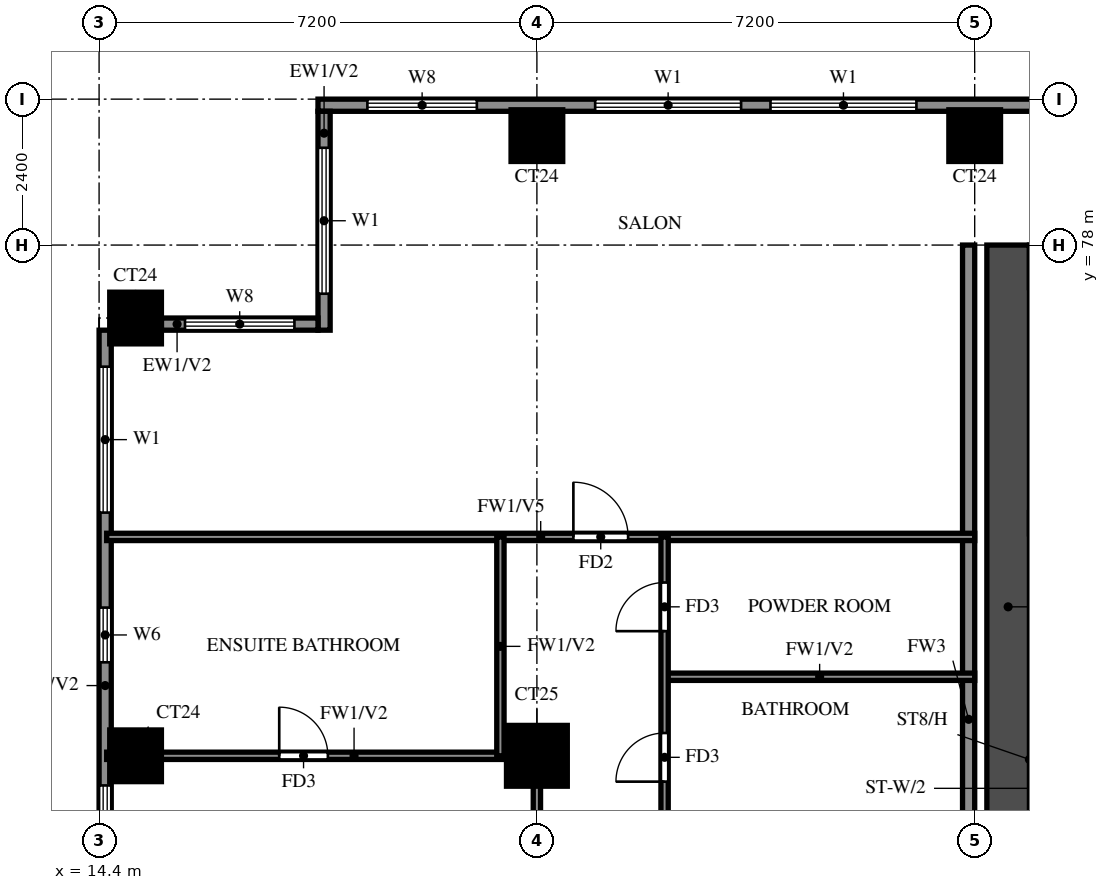
"""IFC4 building model, lengths in metres.
Left out: names, types, materials, properties, quantities, classifications, styles, units other than length and angle.
Written with IfcOpenShell. Run it as: python <this file> out.ifc"""

import sys

from ifc_helpers import new_model, si_unit, direction, frame, frame_2d, origin, origin_2d, place, context, subcontext, project, spatial, rectangle, extrude, source, transform, mapped, element, fill, save


model = new_model("IFC4")
c1 = context("Model", 3, precision=1e-05, world=origin(), true_north=direction((0.0, 1.0)))
c2 = subcontext(c1, "Body", "Model", "MODEL_VIEW")
j1 = project(units=[si_unit("LENGTHUNIT", "METRE"), si_unit("PLANEANGLEUNIT", "RADIAN")], contexts=[c1])
p1 = place(None, origin())
s1 = spatial("IfcSite", under=j1, at=p1, CompositionType="ELEMENT")
p2 = place(p1, origin())
s2 = spatial("IfcBuilding", under=s1, at=p2, CompositionType="ELEMENT")
p3 = place(p2, frame((0.0, 0.0, 157.0)))
s3 = spatial("IfcBuildingStorey", under=s2, at=p3, CompositionType="ELEMENT", Elevation=157.0)
m1 = source(origin(), c2, "Body", "SweptSolid", [
    extrude(rectangle(XDim=0.85, YDim=0.85, at=origin_2d()), origin(), (0.0, 0.0, 1.0), 3.2),
])
p4 = place(p3, frame((15.0, 69.6, 0.0), z_axis=(0.0, 0.0, 1.0), x_axis=(1.0, 0.0, 0.0)))
e1 = element("IfcColumn", 1, at=p4, inside=s3, PredefinedType="COLUMN", context=c2, shape_type="MappedRepresentation", body=[
    mapped(m1, transform((0.0, 0.0, 0.0))),
])
m2 = source(origin(), c2, "Body", "SweptSolid", [
    extrude(rectangle(XDim=1.0, YDim=1.0, at=origin_2d()), origin(), (0.0, 0.0, 1.0), 3.2),
])
p5 = place(p3, frame((21.6, 69.6, 0.0), z_axis=(0.0, 0.0, 1.0), x_axis=(1.0, 0.0, 0.0)))
e2 = element("IfcColumn", 2, at=p5, inside=s3, PredefinedType="COLUMN", context=c2, shape_type="MappedRepresentation", body=[
    mapped(m2, transform((0.0, 0.0, 0.0))),
])
for number, where, z_axis, x_axis in (
    (3, (15.0, 76.8, 0.0), (0.0, 0.0, 1.0), (1.0, 0.0, 0.0)),
    (4, (21.6, 79.8, 0.0), (0.0, 0.0, 1.0), (1.0, 0.0, 0.0)),
    (5, (28.8, 79.8, 0.0), (0.0, 0.0, 1.0), (1.0, 0.0, 0.0)),
):
    element("IfcColumn", number, at=place(p3, frame(where, z_axis=z_axis, x_axis=x_axis)), inside=s3, PredefinedType="COLUMN", context=c2, shape_type="MappedRepresentation", body=[
        mapped(m1, transform((0.0, 0.0, 0.0))),
    ])
p6 = place(p3, frame((29.35, 66.1, 0.0), z_axis=(0.0, 0.0, 1.0), x_axis=(0.0, 1.0, 0.0)))
e6 = element("IfcWall", 6, at=p6, inside=s3, PredefinedType="SHEAR", context=c2, shape_type="SweptSolid", body=[
    extrude(rectangle(XDim=11.9, YDim=0.7, at=frame_2d((5.95, 0.0))), origin(), (0.0, 0.0, 1.0), 3.2),
])
p7 = place(p3, frame((82.6, 80.3, 0.0), z_axis=(0.0, 0.0, 1.0), x_axis=(-1.0, 0.0, 0.0)))
e7 = element("IfcWall", 7, at=p7, inside=s3, PredefinedType="SOLIDWALL", context=c2, shape_type="SweptSolid", body=[
    extrude(rectangle(XDim=64.6, YDim=0.2, at=frame_2d((32.3, 0.0))), origin(), (0.0, 0.0, 1.0), 3.2),
])
p8 = place(p7, frame((4.3, 0.0, 0.0)))
e8 = element("IfcOpeningElement", 8, at=p8, cuts=e7, PredefinedType="OPENING", context=c2, shape_type="SweptSolid", body=[
    extrude(rectangle(XDim=1.8, YDim=2.4, at=frame_2d((0.9, 1.2))), frame((0.0, 0.11, 0.0), z_axis=(0.0, -1.0, 0.0), x_axis=(1.0, 0.0, 0.0)), (0.0, 0.0, 1.0), 0.22),
])
p9 = place(p7, frame((54.758, 0.0, 0.6)))
e9 = element("IfcOpeningElement", 9, at=p9, cuts=e7, PredefinedType="OPENING", context=c2, shape_type="SweptSolid", body=[
    extrude(rectangle(XDim=2.4, YDim=2.4, at=frame_2d((1.2, 1.2))), frame((0.0, 0.11, 0.0), z_axis=(0.0, -1.0, 0.0), x_axis=(1.0, 0.0, 0.0)), (0.0, 0.0, 1.0), 0.22),
])
p10 = place(p7, frame((57.642, 0.0, 0.6)))
e10 = element("IfcOpeningElement", 10, at=p10, cuts=e7, PredefinedType="OPENING", context=c2, shape_type="SweptSolid", body=[
    extrude(rectangle(XDim=2.4, YDim=2.4, at=frame_2d((1.2, 1.2))), frame((0.0, 0.11, 0.0), z_axis=(0.0, -1.0, 0.0), x_axis=(1.0, 0.0, 0.0)), (0.0, 0.0, 1.0), 0.22),
])
p11 = place(p7, frame((61.988, 0.0, 0.6)))
e11 = element("IfcOpeningElement", 11, at=p11, cuts=e7, PredefinedType="OPENING", context=c2, shape_type="SweptSolid", body=[
    extrude(rectangle(XDim=1.8, YDim=2.4, at=frame_2d((0.9, 1.2))), frame((0.0, 0.11, 0.0), z_axis=(0.0, -1.0, 0.0), x_axis=(1.0, 0.0, 0.0)), (0.0, 0.0, 1.0), 0.22),
])
p12 = place(p7, frame((1.712, 0.0, 0.6)))
e12 = element("IfcOpeningElement", 12, at=p12, cuts=e7, PredefinedType="OPENING", context=c2, shape_type="SweptSolid", body=[
    extrude(rectangle(XDim=1.2, YDim=2.4, at=frame_2d((0.6, 1.2))), frame((0.0, 0.11, 0.0), z_axis=(0.0, -1.0, 0.0), x_axis=(1.0, 0.0, 0.0)), (0.0, 0.0, 1.0), 0.22),
])
p13 = place(p7, frame((6.55, 0.0, 0.6)))
e13 = element("IfcOpeningElement", 13, at=p13, cuts=e7, PredefinedType="OPENING", context=c2, shape_type="SweptSolid", body=[
    extrude(rectangle(XDim=0.9, YDim=2.4, at=frame_2d((0.45, 1.2))), frame((0.0, 0.11, 0.0), z_axis=(0.0, -1.0, 0.0), x_axis=(1.0, 0.0, 0.0)), (0.0, 0.0, 1.0), 0.22),
])
p14 = place(p7, frame((8.312, 0.0, 0.6)))
e14 = element("IfcOpeningElement", 14, at=p14, cuts=e7, PredefinedType="OPENING", context=c2, shape_type="SweptSolid", body=[
    extrude(rectangle(XDim=1.8, YDim=2.4, at=frame_2d((0.9, 1.2))), frame((0.0, 0.11, 0.0), z_axis=(0.0, -1.0, 0.0), x_axis=(1.0, 0.0, 0.0)), (0.0, 0.0, 1.0), 0.22),
])
p15 = place(p3, frame((18.1, 80.2, 0.0), z_axis=(0.0, 0.0, 1.0), x_axis=(0.0, -1.0, 0.0)))
e15 = element("IfcWall", 15, at=p15, inside=s3, PredefinedType="SOLIDWALL", context=c2, shape_type="SweptSolid", body=[
    extrude(rectangle(XDim=3.6, YDim=0.2, at=frame_2d((1.8, 0.0))), origin(), (0.0, 0.0, 1.0), 3.2),
])
p16 = place(p15, frame((0.6, 0.0, 0.6)))
e16 = element("IfcOpeningElement", 16, at=p16, cuts=e15, PredefinedType="OPENING", context=c2, shape_type="SweptSolid", body=[
    extrude(rectangle(XDim=2.4, YDim=2.4, at=frame_2d((1.2, 1.2))), frame((0.0, 0.11, 0.0), z_axis=(0.0, -1.0, 0.0), x_axis=(1.0, 0.0, 0.0)), (0.0, 0.0, 1.0), 0.22),
])
p17 = place(p3, frame((18.0, 76.7, 0.0), z_axis=(0.0, 0.0, 1.0), x_axis=(-1.0, 0.0, 0.0)))
e17 = element("IfcWall", 17, at=p17, inside=s3, PredefinedType="SOLIDWALL", context=c2, shape_type="SweptSolid", body=[
    extrude(rectangle(XDim=2.575, YDim=0.2, at=frame_2d((1.288, 0.0))), origin(), (0.0, 0.0, 1.0), 3.2),
])
p18 = place(p17, frame((0.387, 0.0, 0.6)))
e18 = element("IfcOpeningElement", 18, at=p18, cuts=e17, PredefinedType="OPENING", context=c2, shape_type="SweptSolid", body=[
    extrude(rectangle(XDim=1.8, YDim=2.4, at=frame_2d((0.9, 1.2))), frame((0.0, 0.11, 0.0), z_axis=(0.0, -1.0, 0.0), x_axis=(1.0, 0.0, 0.0)), (0.0, 0.0, 1.0), 0.22),
])
p19 = place(p3, frame((14.5, 76.6, 0.0), z_axis=(0.0, 0.0, 1.0), x_axis=(0.0, -1.0, 0.0)))
e19 = element("IfcWall", 19, at=p19, inside=s3, PredefinedType="SOLIDWALL", context=c2, shape_type="SweptSolid", body=[
    extrude(rectangle(XDim=33.4, YDim=0.2, at=frame_2d((16.7, 0.0))), origin(), (0.0, 0.0, 1.0), 3.2),
])
p20 = place(p19, frame((11.5, 0.0, 0.0)))
e20 = element("IfcOpeningElement", 20, at=p20, cuts=e19, PredefinedType="OPENING", context=c2, shape_type="SweptSolid", body=[
    extrude(rectangle(XDim=1.8, YDim=2.4, at=frame_2d((0.9, 1.2))), frame((0.0, 0.11, 0.0), z_axis=(0.0, -1.0, 0.0), x_axis=(1.0, 0.0, 0.0)), (0.0, 0.0, 1.0), 0.22),
])
p21 = place(p19, frame((25.9, 0.0, 0.0)))
e21 = element("IfcOpeningElement", 21, at=p21, cuts=e19, PredefinedType="OPENING", context=c2, shape_type="SweptSolid", body=[
    extrude(rectangle(XDim=1.8, YDim=2.4, at=frame_2d((0.9, 1.2))), frame((0.0, 0.11, 0.0), z_axis=(0.0, -1.0, 0.0), x_axis=(1.0, 0.0, 0.0)), (0.0, 0.0, 1.0), 0.22),
])
p22 = place(p19, frame((29.087, 0.0, 0.6)))
e22 = element("IfcOpeningElement", 22, at=p22, cuts=e19, PredefinedType="OPENING", context=c2, shape_type="SweptSolid", body=[
    extrude(rectangle(XDim=1.2, YDim=2.4, at=frame_2d((0.6, 1.2))), frame((0.0, 0.11, 0.0), z_axis=(0.0, -1.0, 0.0), x_axis=(1.0, 0.0, 0.0)), (0.0, 0.0, 1.0), 0.22),
])
p23 = place(p19, frame((31.2, 0.0, 0.6)))
e23 = element("IfcOpeningElement", 23, at=p23, cuts=e19, PredefinedType="OPENING", context=c2, shape_type="SweptSolid", body=[
    extrude(rectangle(XDim=1.8, YDim=2.4, at=frame_2d((0.9, 1.2))), frame((0.0, 0.11, 0.0), z_axis=(0.0, -1.0, 0.0), x_axis=(1.0, 0.0, 0.0)), (0.0, 0.0, 1.0), 0.22),
])
p24 = place(p19, frame((21.887, 0.0, 0.6)))
e24 = element("IfcOpeningElement", 24, at=p24, cuts=e19, PredefinedType="OPENING", context=c2, shape_type="SweptSolid", body=[
    extrude(rectangle(XDim=1.8, YDim=2.4, at=frame_2d((0.9, 1.2))), frame((0.0, 0.11, 0.0), z_axis=(0.0, -1.0, 0.0), x_axis=(1.0, 0.0, 0.0)), (0.0, 0.0, 1.0), 0.22),
])
p25 = place(p19, frame((24.55, 0.0, 0.6)))
e25 = element("IfcOpeningElement", 25, at=p25, cuts=e19, PredefinedType="OPENING", context=c2, shape_type="SweptSolid", body=[
    extrude(rectangle(XDim=0.9, YDim=2.4, at=frame_2d((0.45, 1.2))), frame((0.0, 0.11, 0.0), z_axis=(0.0, -1.0, 0.0), x_axis=(1.0, 0.0, 0.0)), (0.0, 0.0, 1.0), 0.22),
])
p26 = place(p19, frame((18.212, 0.0, 0.6)))
e26 = element("IfcOpeningElement", 26, at=p26, cuts=e19, PredefinedType="OPENING", context=c2, shape_type="SweptSolid", body=[
    extrude(rectangle(XDim=2.4, YDim=2.4, at=frame_2d((1.2, 1.2))), frame((0.0, 0.11, 0.0), z_axis=(0.0, -1.0, 0.0), x_axis=(1.0, 0.0, 0.0)), (0.0, 0.0, 1.0), 0.22),
])
p27 = place(p19, frame((14.688, 0.0, 0.6)))
e27 = element("IfcOpeningElement", 27, at=p27, cuts=e19, PredefinedType="OPENING", context=c2, shape_type="SweptSolid", body=[
    extrude(rectangle(XDim=1.2, YDim=2.4, at=frame_2d((0.6, 1.2))), frame((0.0, 0.11, 0.0), z_axis=(0.0, -1.0, 0.0), x_axis=(1.0, 0.0, 0.0)), (0.0, 0.0, 1.0), 0.22),
])
p28 = place(p19, frame((16.75, 0.0, 0.6)))
e28 = element("IfcOpeningElement", 28, at=p28, cuts=e19, PredefinedType="OPENING", context=c2, shape_type="SweptSolid", body=[
    extrude(rectangle(XDim=0.9, YDim=2.4, at=frame_2d((0.45, 1.2))), frame((0.0, 0.11, 0.0), z_axis=(0.0, -1.0, 0.0), x_axis=(1.0, 0.0, 0.0)), (0.0, 0.0, 1.0), 0.22),
])
p29 = place(p19, frame((7.488, 0.0, 0.6)))
e29 = element("IfcOpeningElement", 29, at=p29, cuts=e19, PredefinedType="OPENING", context=c2, shape_type="SweptSolid", body=[
    extrude(rectangle(XDim=1.8, YDim=2.4, at=frame_2d((0.9, 1.2))), frame((0.0, 0.11, 0.0), z_axis=(0.0, -1.0, 0.0), x_axis=(1.0, 0.0, 0.0)), (0.0, 0.0, 1.0), 0.22),
])
p30 = place(p19, frame((10.15, 0.0, 0.6)))
e30 = element("IfcOpeningElement", 30, at=p30, cuts=e19, PredefinedType="OPENING", context=c2, shape_type="SweptSolid", body=[
    extrude(rectangle(XDim=0.9, YDim=2.4, at=frame_2d((0.45, 1.2))), frame((0.0, 0.11, 0.0), z_axis=(0.0, -1.0, 0.0), x_axis=(1.0, 0.0, 0.0)), (0.0, 0.0, 1.0), 0.22),
])
p31 = place(p19, frame((4.562, 0.0, 1.5)))
e31 = element("IfcOpeningElement", 31, at=p31, cuts=e19, PredefinedType="OPENING", context=c2, shape_type="SweptSolid", body=[
    extrude(rectangle(XDim=0.9, YDim=0.9, at=frame_2d((0.45, 0.45))), frame((0.0, 0.11, 0.0), z_axis=(0.0, -1.0, 0.0), x_axis=(1.0, 0.0, 0.0)), (0.0, 0.0, 1.0), 0.22),
])
p32 = place(p19, frame((0.6, 0.0, 0.6)))
e32 = element("IfcOpeningElement", 32, at=p32, cuts=e19, PredefinedType="OPENING", context=c2, shape_type="SweptSolid", body=[
    extrude(rectangle(XDim=2.4, YDim=2.4, at=frame_2d((1.2, 1.2))), frame((0.0, 0.11, 0.0), z_axis=(0.0, -1.0, 0.0), x_axis=(1.0, 0.0, 0.0)), (0.0, 0.0, 1.0), 0.22),
])
p33 = place(p3, frame((28.7, 62.4, 0.0), z_axis=(0.0, 0.0, 1.0), x_axis=(0.0, 1.0, 0.0)))
e33 = element("IfcWall", 33, at=p33, inside=s3, PredefinedType="SOLIDWALL", context=c2, shape_type="SweptSolid", body=[
    extrude(rectangle(XDim=15.6, YDim=0.2, at=frame_2d((7.8, 0.0))), origin(), (0.0, 0.0, 1.0), 3.2),
])
p34 = place(p3, frame((14.525, 69.6, 0.0), z_axis=(0.0, 0.0, 1.0), x_axis=(1.0, 0.0, 0.0)))
e34 = element("IfcWall", 34, at=p34, inside=s3, PredefinedType="PARTITIONING", context=c2, shape_type="SweptSolid", body=[
    extrude(rectangle(XDim=7.075, YDim=0.12, at=frame_2d((3.538, 0.0))), origin(), (0.0, 0.0, 1.0), 3.2),
])
p35 = place(p34, frame((2.837, 0.0, 0.0)))
e35 = element("IfcOpeningElement", 35, at=p35, cuts=e34, PredefinedType="OPENING", context=c2, shape_type="SweptSolid", body=[
    extrude(rectangle(XDim=0.8, YDim=2.1, at=frame_2d((0.4, 1.05))), frame((0.0, 0.07, 0.0), z_axis=(0.0, -1.0, 0.0), x_axis=(1.0, 0.0, 0.0)), (0.0, 0.0, 1.0), 0.14),
])
p36 = place(p3, frame((23.7, 70.9, 0.0), z_axis=(0.0, 0.0, 1.0), x_axis=(1.0, 0.0, 0.0)))
e36 = element("IfcWall", 36, at=p36, inside=s3, PredefinedType="PARTITIONING", context=c2, shape_type="SweptSolid", body=[
    extrude(rectangle(XDim=5.1, YDim=0.12, at=frame_2d((2.55, 0.0))), origin(), (0.0, 0.0, 1.0), 3.2),
])
p37 = place(p3, frame((14.525, 73.2, 0.0), z_axis=(0.0, 0.0, 1.0), x_axis=(1.0, 0.0, 0.0)))
e37 = element("IfcWall", 37, at=p37, inside=s3, PredefinedType="PARTITIONING", context=c2, shape_type="SweptSolid", body=[
    extrude(rectangle(XDim=14.275, YDim=0.12, at=frame_2d((7.138, 0.0))), origin(), (0.0, 0.0, 1.0), 2.3),
])
p38 = place(p37, frame((7.675, 0.0, 0.0)))
e38 = element("IfcOpeningElement", 38, at=p38, cuts=e37, PredefinedType="OPENING", context=c2, shape_type="SweptSolid", body=[
    extrude(rectangle(XDim=0.9, YDim=2.1, at=frame_2d((0.45, 1.05))), frame((0.0, 0.07, 0.0), z_axis=(0.0, -1.0, 0.0), x_axis=(1.0, 0.0, 0.0)), (0.0, 0.0, 1.0), 0.14),
])
p39 = place(p3, frame((21.0, 69.6, 0.0), z_axis=(0.0, 0.0, 1.0), x_axis=(0.0, 1.0, 0.0)))
e39 = element("IfcWall", 39, at=p39, inside=s3, PredefinedType="PARTITIONING", context=c2, shape_type="SweptSolid", body=[
    extrude(rectangle(XDim=3.6, YDim=0.12, at=frame_2d((1.8, 0.0))), origin(), (0.0, 0.0, 1.0), 3.2),
])
p40 = place(p3, frame((21.6, 48.0, 0.0), z_axis=(0.0, 0.0, 1.0), x_axis=(0.0, 1.0, 0.0)))
e40 = element("IfcWall", 40, at=p40, inside=s3, PredefinedType="PARTITIONING", context=c2, shape_type="SweptSolid", body=[
    extrude(rectangle(XDim=21.6, YDim=0.12, at=frame_2d((10.8, 0.0))), origin(), (0.0, 0.0, 1.0), 3.2),
])
p41 = place(p40, frame((2.85, 0.0, 0.0)))
e41 = element("IfcOpeningElement", 41, at=p41, cuts=e40, PredefinedType="OPENING", context=c2, shape_type="SweptSolid", body=[
    extrude(rectangle(XDim=1.5, YDim=2.1, at=frame_2d((0.75, 1.05))), frame((0.0, 0.07, 0.0), z_axis=(0.0, -1.0, 0.0), x_axis=(1.0, 0.0, 0.0)), (0.0, 0.0, 1.0), 0.14),
])
p42 = place(p40, frame((8.55, 0.0, 0.0)))
e42 = element("IfcOpeningElement", 42, at=p42, cuts=e40, PredefinedType="OPENING", context=c2, shape_type="SweptSolid", body=[
    extrude(rectangle(XDim=0.9, YDim=2.1, at=frame_2d((0.45, 1.05))), frame((0.0, 0.07, 0.0), z_axis=(0.0, -1.0, 0.0), x_axis=(1.0, 0.0, 0.0)), (0.0, 0.0, 1.0), 0.14),
])
p43 = place(p40, frame((12.15, 0.0, 0.0)))
e43 = element("IfcOpeningElement", 43, at=p43, cuts=e40, PredefinedType="OPENING", context=c2, shape_type="SweptSolid", body=[
    extrude(rectangle(XDim=0.9, YDim=2.1, at=frame_2d((0.45, 1.05))), frame((0.0, 0.07, 0.0), z_axis=(0.0, -1.0, 0.0), x_axis=(1.0, 0.0, 0.0)), (0.0, 0.0, 1.0), 0.14),
])
p44 = place(p40, frame((17.55, 0.0, 0.0)))
e44 = element("IfcOpeningElement", 44, at=p44, cuts=e40, PredefinedType="OPENING", context=c2, shape_type="SweptSolid", body=[
    extrude(rectangle(XDim=0.9, YDim=2.1, at=frame_2d((0.45, 1.05))), frame((0.0, 0.07, 0.0), z_axis=(0.0, -1.0, 0.0), x_axis=(1.0, 0.0, 0.0)), (0.0, 0.0, 1.0), 0.14),
])
p45 = place(p3, frame((23.7, 61.2, 0.0), z_axis=(0.0, 0.0, 1.0), x_axis=(0.0, 1.0, 0.0)))
e45 = element("IfcWall", 45, at=p45, inside=s3, PredefinedType="PARTITIONING", context=c2, shape_type="SweptSolid", body=[
    extrude(rectangle(XDim=12.0, YDim=0.12, at=frame_2d((6.0, 0.0))), origin(), (0.0, 0.0, 1.0), 3.2),
])
p46 = place(p45, frame((4.2, 0.0, 0.0)))
e46 = element("IfcOpeningElement", 46, at=p46, cuts=e45, PredefinedType="OPENING", context=c2, shape_type="SweptSolid", body=[
    extrude(rectangle(XDim=0.9, YDim=2.1, at=frame_2d((0.45, 1.05))), frame((0.0, 0.07, 0.0), z_axis=(0.0, -1.0, 0.0), x_axis=(1.0, 0.0, 0.0)), (0.0, 0.0, 1.0), 0.14),
])
p47 = place(p45, frame((7.975, 0.0, 0.0)))
e47 = element("IfcOpeningElement", 47, at=p47, cuts=e45, PredefinedType="OPENING", context=c2, shape_type="SweptSolid", body=[
    extrude(rectangle(XDim=0.8, YDim=2.1, at=frame_2d((0.4, 1.05))), frame((0.0, 0.07, 0.0), z_axis=(0.0, -1.0, 0.0), x_axis=(1.0, 0.0, 0.0)), (0.0, 0.0, 1.0), 0.14),
])
p48 = place(p45, frame((10.45, 0.0, 0.0)))
e48 = element("IfcOpeningElement", 48, at=p48, cuts=e45, PredefinedType="OPENING", context=c2, shape_type="SweptSolid", body=[
    extrude(rectangle(XDim=0.8, YDim=2.1, at=frame_2d((0.4, 1.05))), frame((0.0, 0.07, 0.0), z_axis=(0.0, -1.0, 0.0), x_axis=(1.0, 0.0, 0.0)), (0.0, 0.0, 1.0), 0.14),
])
p49 = place(p9, origin())
e49 = element("IfcWindow", 49, at=p49, inside=s3, PartitioningType="DOUBLE_PANEL_VERTICAL", PredefinedType="WINDOW", context=c2, shape_type="SweptSolid", body=[
    extrude(rectangle(XDim=2.4, YDim=2.4, at=frame_2d((1.2, 1.2))), frame((0.0, 0.03, 0.0), z_axis=(0.0, -1.0, 0.0), x_axis=(1.0, 0.0, 0.0)), (0.0, 0.0, 1.0), 0.06),
])
fill(e9, e49)
p50 = place(p10, origin())
e50 = element("IfcWindow", 50, at=p50, inside=s3, PartitioningType="DOUBLE_PANEL_VERTICAL", PredefinedType="WINDOW", context=c2, shape_type="SweptSolid", body=[
    extrude(rectangle(XDim=2.4, YDim=2.4, at=frame_2d((1.2, 1.2))), frame((0.0, 0.03, 0.0), z_axis=(0.0, -1.0, 0.0), x_axis=(1.0, 0.0, 0.0)), (0.0, 0.0, 1.0), 0.06),
])
fill(e10, e50)
p51 = place(p11, origin())
e51 = element("IfcWindow", 51, at=p51, inside=s3, PartitioningType="DOUBLE_PANEL_VERTICAL", PredefinedType="WINDOW", context=c2, shape_type="SweptSolid", body=[
    extrude(rectangle(XDim=1.8, YDim=2.4, at=frame_2d((0.9, 1.2))), frame((0.0, 0.03, 0.0), z_axis=(0.0, -1.0, 0.0), x_axis=(1.0, 0.0, 0.0)), (0.0, 0.0, 1.0), 0.06),
])
fill(e11, e51)
p52 = place(p16, origin())
e52 = element("IfcWindow", 52, at=p52, inside=s3, PartitioningType="DOUBLE_PANEL_VERTICAL", PredefinedType="WINDOW", context=c2, shape_type="SweptSolid", body=[
    extrude(rectangle(XDim=2.4, YDim=2.4, at=frame_2d((1.2, 1.2))), frame((0.0, 0.03, 0.0), z_axis=(0.0, -1.0, 0.0), x_axis=(1.0, 0.0, 0.0)), (0.0, 0.0, 1.0), 0.06),
])
fill(e16, e52)
p53 = place(p18, origin())
e53 = element("IfcWindow", 53, at=p53, inside=s3, PartitioningType="DOUBLE_PANEL_VERTICAL", PredefinedType="WINDOW", context=c2, shape_type="SweptSolid", body=[
    extrude(rectangle(XDim=1.8, YDim=2.4, at=frame_2d((0.9, 1.2))), frame((0.0, 0.03, 0.0), z_axis=(0.0, -1.0, 0.0), x_axis=(1.0, 0.0, 0.0)), (0.0, 0.0, 1.0), 0.06),
])
fill(e18, e53)
p54 = place(p29, origin())
e54 = element("IfcWindow", 54, at=p54, inside=s3, PartitioningType="DOUBLE_PANEL_VERTICAL", PredefinedType="WINDOW", context=c2, shape_type="SweptSolid", body=[
    extrude(rectangle(XDim=1.8, YDim=2.4, at=frame_2d((0.9, 1.2))), frame((0.0, 0.03, 0.0), z_axis=(0.0, -1.0, 0.0), x_axis=(1.0, 0.0, 0.0)), (0.0, 0.0, 1.0), 0.06),
])
fill(e29, e54)
p55 = place(p31, origin())
e55 = element("IfcWindow", 55, at=p55, inside=s3, PartitioningType="SINGLE_PANEL", PredefinedType="WINDOW", context=c2, shape_type="SweptSolid", body=[
    extrude(rectangle(XDim=0.9, YDim=0.9, at=frame_2d((0.45, 0.45))), frame((0.0, 0.03, 0.0), z_axis=(0.0, -1.0, 0.0), x_axis=(1.0, 0.0, 0.0)), (0.0, 0.0, 1.0), 0.06),
])
fill(e31, e55)
p56 = place(p32, origin())
e56 = element("IfcWindow", 56, at=p56, inside=s3, PartitioningType="DOUBLE_PANEL_VERTICAL", PredefinedType="WINDOW", context=c2, shape_type="SweptSolid", body=[
    extrude(rectangle(XDim=2.4, YDim=2.4, at=frame_2d((1.2, 1.2))), frame((0.0, 0.03, 0.0), z_axis=(0.0, -1.0, 0.0), x_axis=(1.0, 0.0, 0.0)), (0.0, 0.0, 1.0), 0.06),
])
fill(e32, e56)
p57 = place(p35, origin())
e57 = element("IfcDoor", 57, at=p57, inside=s3, OperationType="SINGLE_SWING_LEFT", PredefinedType="DOOR", context=c2, shape_type="SweptSolid", body=[
    extrude(rectangle(XDim=0.8, YDim=2.1, at=frame_2d((0.4, 1.05))), frame((0.0, 0.025, 0.0), z_axis=(0.0, -1.0, 0.0), x_axis=(1.0, 0.0, 0.0)), (0.0, 0.0, 1.0), 0.05),
])
fill(e35, e57)
p58 = place(p38, origin())
e58 = element("IfcDoor", 58, at=p58, inside=s3, OperationType="SINGLE_SWING_RIGHT", PredefinedType="DOOR", context=c2, shape_type="SweptSolid", body=[
    extrude(rectangle(XDim=0.9, YDim=2.1, at=frame_2d((0.45, 1.05))), frame((0.0, 0.025, 0.0), z_axis=(0.0, -1.0, 0.0), x_axis=(1.0, 0.0, 0.0)), (0.0, 0.0, 1.0), 0.05),
])
fill(e38, e58)
p59 = place(p47, origin())
e59 = element("IfcDoor", 59, at=p59, inside=s3, OperationType="SINGLE_SWING_RIGHT", PredefinedType="DOOR", context=c2, shape_type="SweptSolid", body=[
    extrude(rectangle(XDim=0.8, YDim=2.1, at=frame_2d((0.4, 1.05))), frame((0.0, 0.025, 0.0), z_axis=(0.0, -1.0, 0.0), x_axis=(1.0, 0.0, 0.0)), (0.0, 0.0, 1.0), 0.05),
])
fill(e47, e59)
p60 = place(p48, origin())
e60 = element("IfcDoor", 60, at=p60, inside=s3, OperationType="SINGLE_SWING_LEFT", PredefinedType="DOOR", context=c2, shape_type="SweptSolid", body=[
    extrude(rectangle(XDim=0.8, YDim=2.1, at=frame_2d((0.4, 1.05))), frame((0.0, 0.025, 0.0), z_axis=(0.0, -1.0, 0.0), x_axis=(1.0, 0.0, 0.0)), (0.0, 0.0, 1.0), 0.05),
])
fill(e48, e60)
save(model, sys.argv[1])
